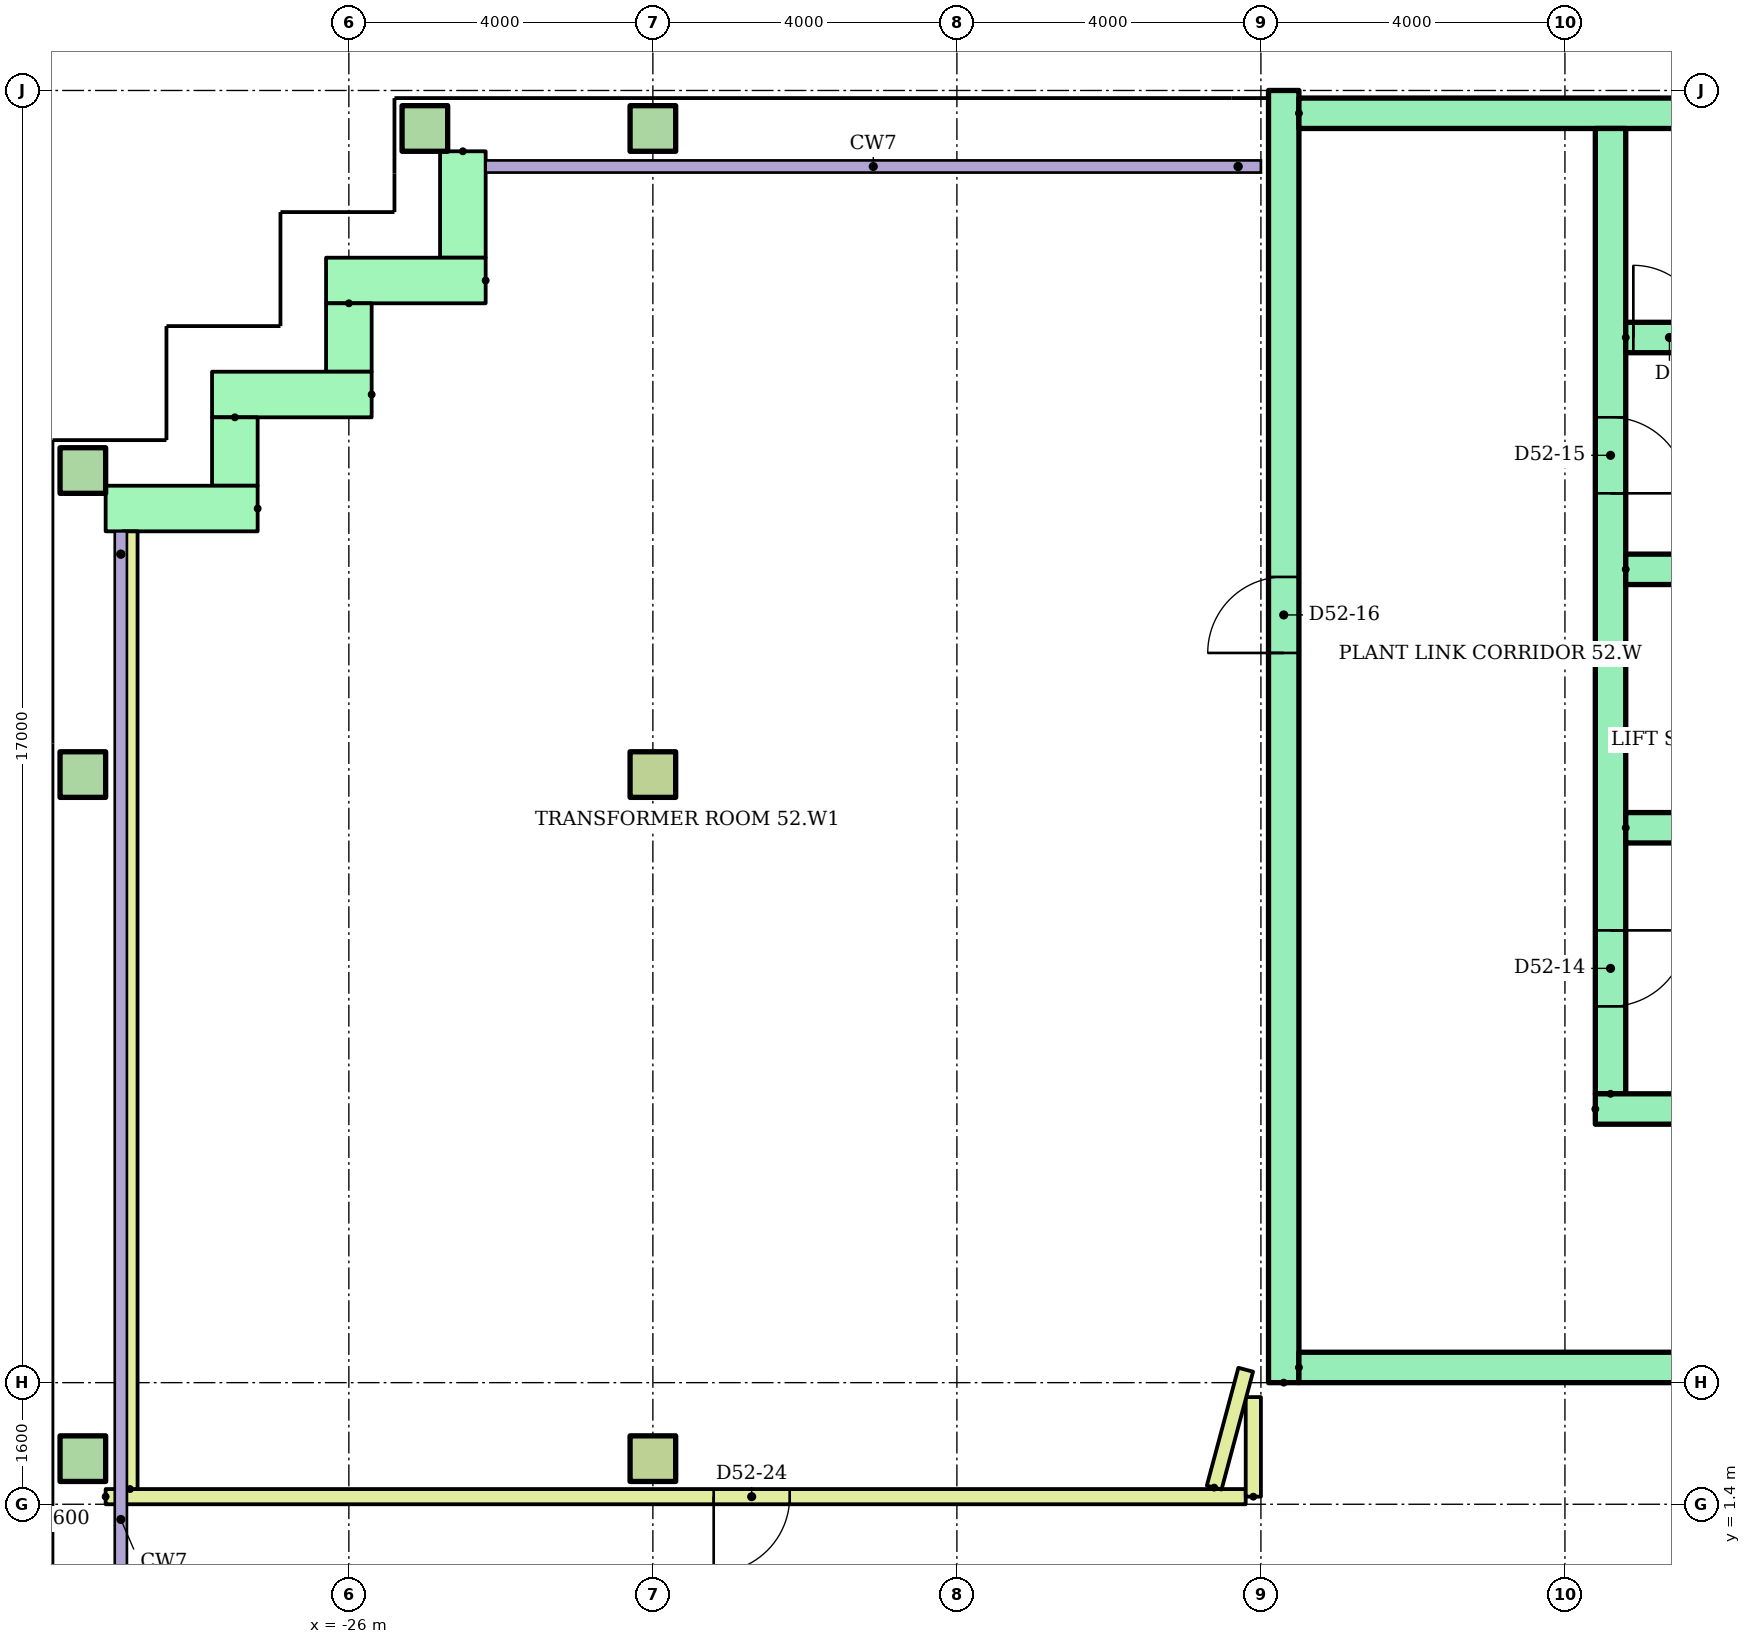
"""IFC4 building model, lengths in metres.
Left out: names, types, materials, properties, quantities, classifications, styles, units other than length and angle.
Written with IfcOpenShell. Run it as: python <this file> out.ifc"""

import sys

from ifc_helpers import new_model, si_unit, direction, frame, frame_2d, origin, origin_2d, place, context, subcontext, project, spatial, rectangle, hollow_rectangle, extrude, element, fill, save


model = new_model("IFC4")
c1 = context("Model", 3, precision=1e-05, world=origin(), true_north=direction((0.0, 1.0)))
c2 = subcontext(c1, "Body", "Model", "MODEL_VIEW")
j1 = project(units=[si_unit("LENGTHUNIT", "METRE"), si_unit("PLANEANGLEUNIT", "RADIAN")], contexts=[c1])
p1 = place(None, origin())
s1 = spatial("IfcSite", under=j1, at=p1, CompositionType="ELEMENT")
p2 = place(p1, origin())
s2 = spatial("IfcBuilding", under=s1, at=p2, CompositionType="ELEMENT")
p3 = place(p2, frame((0.0, 0.0, 203.7)))
s3 = spatial("IfcBuildingStorey", under=s2, at=p3, CompositionType="ELEMENT", Elevation=203.7)
p4 = place(p3, frame((-29.5, 2.0, 0.0)))
e1 = element("IfcColumn", 1, at=p4, inside=s3, PredefinedType="COLUMN", context=c2, shape_type="SweptSolid", body=[
    extrude(hollow_rectangle(XDim=0.6, YDim=0.6, WallThickness=0.03, at=origin_2d()), origin(), (0.0, 0.0, 1.0), 3.9),
])
p5 = place(p3, frame((-22.0, 2.0, 0.0)))
e2 = element("IfcColumn", 2, at=p5, inside=s3, PredefinedType="COLUMN", context=c2, shape_type="SweptSolid", body=[
    extrude(rectangle(XDim=0.6, YDim=0.6, at=origin_2d()), origin(), (0.0, 0.0, 1.0), 3.9),
])
p6 = place(p3, frame((-29.5, 11.0, 0.0)))
e3 = element("IfcColumn", 3, at=p6, inside=s3, PredefinedType="COLUMN", context=c2, shape_type="SweptSolid", body=[
    extrude(hollow_rectangle(XDim=0.6, YDim=0.6, WallThickness=0.03, at=origin_2d()), origin(), (0.0, 0.0, 1.0), 3.9),
])
p7 = place(p3, frame((-22.0, 11.0, 0.0)))
e4 = element("IfcColumn", 4, at=p7, inside=s3, PredefinedType="COLUMN", context=c2, shape_type="SweptSolid", body=[
    extrude(rectangle(XDim=0.6, YDim=0.6, at=origin_2d()), origin(), (0.0, 0.0, 1.0), 3.9),
])
for number, where in (
    (5, (-29.5, 15.0, 0.0)),
    (6, (-25.0, 19.5, 0.0)),
    (7, (-22.0, 19.5, 0.0)),
):
    element("IfcColumn", number, at=place(p3, frame(where)), inside=s3, PredefinedType="COLUMN", context=c2, shape_type="SweptSolid", body=[
        extrude(hollow_rectangle(XDim=0.6, YDim=0.6, WallThickness=0.03, at=origin_2d()), origin(), (0.0, 0.0, 1.0), 3.9),
    ])
p8 = place(p3, frame((-24.5, 19.2, 0.0), z_axis=(0.0, 0.0, 1.0), x_axis=(0.0, -1.0, 0.0)))
e8 = element("IfcWall", 8, at=p8, inside=s3, PredefinedType="STANDARD", context=c2, shape_type="SweptSolid", body=[
    extrude(rectangle(XDim=1.4, YDim=0.6, at=frame_2d((0.7, 0.0))), origin(), (0.0, 0.0, 1.0), 3.62),
])
p9 = place(p3, frame((-24.2, 17.5, 0.0), z_axis=(0.0, 0.0, 1.0), x_axis=(-1.0, 0.0, 0.0)))
e9 = element("IfcWall", 9, at=p9, inside=s3, PredefinedType="STANDARD", context=c2, shape_type="SweptSolid", body=[
    extrude(rectangle(XDim=2.1, YDim=0.6, at=frame_2d((1.05, 0.0))), origin(), (0.0, 0.0, 1.0), 3.62),
])
p10 = place(p3, frame((-26.0, 17.2, 0.0), z_axis=(0.0, 0.0, 1.0), x_axis=(0.0, -1.0, 0.0)))
e10 = element("IfcWall", 10, at=p10, inside=s3, PredefinedType="STANDARD", context=c2, shape_type="SweptSolid", body=[
    extrude(rectangle(XDim=0.9, YDim=0.6, at=frame_2d((0.45, 0.0))), origin(), (0.0, 0.0, 1.0), 3.62),
])
p11 = place(p3, frame((-25.7, 16.0, 0.0), z_axis=(0.0, 0.0, 1.0), x_axis=(-1.0, 0.0, 0.0)))
e11 = element("IfcWall", 11, at=p11, inside=s3, PredefinedType="STANDARD", context=c2, shape_type="SweptSolid", body=[
    extrude(rectangle(XDim=2.1, YDim=0.6, at=frame_2d((1.05, 0.0))), origin(), (0.0, 0.0, 1.0), 3.62),
])
p12 = place(p3, frame((-27.5, 15.7, 0.0), z_axis=(0.0, 0.0, 1.0), x_axis=(0.0, -1.0, 0.0)))
e12 = element("IfcWall", 12, at=p12, inside=s3, PredefinedType="STANDARD", context=c2, shape_type="SweptSolid", body=[
    extrude(rectangle(XDim=0.9, YDim=0.6, at=frame_2d((0.45, 0.0))), origin(), (0.0, 0.0, 1.0), 3.62),
])
p13 = place(p3, frame((-27.2, 14.5, 0.0), z_axis=(0.0, 0.0, 1.0), x_axis=(-1.0, 0.0, 0.0)))
e13 = element("IfcWall", 13, at=p13, inside=s3, PredefinedType="STANDARD", context=c2, shape_type="SweptSolid", body=[
    extrude(rectangle(XDim=2.0, YDim=0.6, at=frame_2d((1.0, 0.0))), origin(), (0.0, 0.0, 1.0), 3.62),
])
p14 = place(p3, frame((-13.7, 3.0, 0.0), z_axis=(0.0, 0.0, 1.0), x_axis=(0.0, 1.0, 0.0)))
e14 = element("IfcWall", 14, at=p14, inside=s3, PredefinedType="SHEAR", context=c2, shape_type="SweptSolid", body=[
    extrude(rectangle(XDim=17.0, YDim=0.4, at=frame_2d((8.5, 0.0))), origin(), (0.0, 0.0, 1.0), 3.62),
])
p15 = place(p14, frame((9.6, 0.0, 0.0)))
e15 = element("IfcOpeningElement", 15, at=p15, cuts=e14, PredefinedType="OPENING", context=c2, shape_type="SweptSolid", body=[
    extrude(rectangle(XDim=1.0, YDim=2.1, at=frame_2d((0.5, 1.05))), frame((0.0, 0.21, 0.0), z_axis=(0.0, -1.0, 0.0), x_axis=(1.0, 0.0, 0.0)), (0.0, 0.0, 1.0), 0.42),
])
p16 = place(p3, frame((-13.5, 19.7, 0.0)))
e16 = element("IfcWall", 16, at=p16, inside=s3, PredefinedType="SHEAR", context=c2, shape_type="SweptSolid", body=[
    extrude(rectangle(XDim=27.0, YDim=0.4, at=frame_2d((13.5, 0.0))), origin(), (0.0, 0.0, 1.0), 3.62),
])
p17 = place(p3, frame((-9.4, 6.8, 0.0), z_axis=(0.0, 0.0, 1.0), x_axis=(0.0, 1.0, 0.0)))
e17 = element("IfcWall", 17, at=p17, inside=s3, PredefinedType="SHEAR", context=c2, shape_type="SweptSolid", body=[
    extrude(rectangle(XDim=12.7, YDim=0.4, at=frame_2d((6.35, 0.0))), origin(), (0.0, 0.0, 1.0), 3.62),
])
p18 = place(p17, frame((1.15, 0.0, 0.0)))
e18 = element("IfcOpeningElement", 18, at=p18, cuts=e17, PredefinedType="OPENING", context=c2, shape_type="SweptSolid", body=[
    extrude(rectangle(XDim=1.0, YDim=2.1, at=frame_2d((0.5, 1.05))), frame((0.0, 0.21, 0.0), z_axis=(0.0, -1.0, 0.0), x_axis=(1.0, 0.0, 0.0)), (0.0, 0.0, 1.0), 0.42),
])
p19 = place(p17, frame((7.9, 0.0, 0.0)))
e19 = element("IfcOpeningElement", 19, at=p19, cuts=e17, PredefinedType="OPENING", context=c2, shape_type="SweptSolid", body=[
    extrude(rectangle(XDim=1.0, YDim=2.1, at=frame_2d((0.5, 1.05))), frame((0.0, 0.21, 0.0), z_axis=(0.0, -1.0, 0.0), x_axis=(1.0, 0.0, 0.0)), (0.0, 0.0, 1.0), 0.42),
])
p20 = place(p3, frame((-13.5, 3.2, 0.0)))
e20 = element("IfcWall", 20, at=p20, inside=s3, PredefinedType="SHEAR", context=c2, shape_type="SweptSolid", body=[
    extrude(rectangle(XDim=27.0, YDim=0.4, at=frame_2d((13.5, 0.0))), origin(), (0.0, 0.0, 1.0), 3.62),
])
p21 = place(p20, frame((22.083, 0.0, 0.0)))
e21 = element("IfcOpeningElement", 21, at=p21, cuts=e20, PredefinedType="OPENING", context=c2, shape_type="SweptSolid", body=[
    extrude(rectangle(XDim=1.1, YDim=2.1, at=frame_2d((0.55, 1.05))), frame((0.0, 0.21, 0.0), z_axis=(0.0, -1.0, 0.0), x_axis=(1.0, 0.0, 0.0)), (0.0, 0.0, 1.0), 0.42),
])
p22 = place(p20, frame((25.128, 0.0, 0.0)))
e22 = element("IfcOpeningElement", 22, at=p22, cuts=e20, PredefinedType="OPENING", context=c2, shape_type="SweptSolid", body=[
    extrude(rectangle(XDim=1.1, YDim=2.1, at=frame_2d((0.55, 1.05))), frame((0.0, 0.21, 0.0), z_axis=(0.0, -1.0, 0.0), x_axis=(1.0, 0.0, 0.0)), (0.0, 0.0, 1.0), 0.42),
])
p23 = place(p20, frame((12.6, 0.0, 0.0)))
e23 = element("IfcOpeningElement", 23, at=p23, cuts=e20, PredefinedType="OPENING", context=c2, shape_type="SweptSolid", body=[
    extrude(rectangle(XDim=1.8, YDim=2.1, at=frame_2d((0.9, 1.05))), frame((0.0, 0.21, 0.0), z_axis=(0.0, -1.0, 0.0), x_axis=(1.0, 0.0, 0.0)), (0.0, 0.0, 1.0), 0.42),
])
p24 = place(p3, frame((-9.6, 6.6, 0.0)))
e24 = element("IfcWall", 24, at=p24, inside=s3, PredefinedType="SHEAR", context=c2, shape_type="SweptSolid", body=[
    extrude(rectangle(XDim=8.078, YDim=0.4, at=frame_2d((4.039, 0.0))), origin(), (0.0, 0.0, 1.0), 3.62),
])
p25 = place(p24, frame((3.011, 0.0, 0.0)))
e25 = element("IfcOpeningElement", 25, at=p25, cuts=e24, PredefinedType="OPENING", context=c2, shape_type="SweptSolid", body=[
    extrude(rectangle(XDim=1.0, YDim=2.1, at=frame_2d((0.5, 1.05))), frame((0.0, 0.21, 0.0), z_axis=(0.0, -1.0, 0.0), x_axis=(1.0, 0.0, 0.0)), (0.0, 0.0, 1.0), 0.42),
])
p26 = place(p24, frame((6.056, 0.0, 0.0)))
e26 = element("IfcOpeningElement", 26, at=p26, cuts=e24, PredefinedType="OPENING", context=c2, shape_type="SweptSolid", body=[
    extrude(rectangle(XDim=1.0, YDim=2.1, at=frame_2d((0.5, 1.05))), frame((0.0, 0.21, 0.0), z_axis=(0.0, -1.0, 0.0), x_axis=(1.0, 0.0, 0.0)), (0.0, 0.0, 1.0), 0.42),
])
p27 = place(p3, frame((-9.2, 10.3, 0.0)))
e27 = element("IfcWall", 27, at=p27, inside=s3, PredefinedType="SHEAR", context=c2, shape_type="SweptSolid", body=[
    extrude(rectangle(XDim=8.0, YDim=0.4, at=frame_2d((4.0, 0.0))), origin(), (0.0, 0.0, 1.0), 3.62),
])
p28 = place(p27, frame((0.617, 0.0, 0.0)))
e28 = element("IfcOpeningElement", 28, at=p28, cuts=e27, PredefinedType="OPENING", context=c2, shape_type="SweptSolid", body=[
    extrude(rectangle(XDim=1.1, YDim=2.1, at=frame_2d((0.55, 1.05))), frame((0.0, 0.21, 0.0), z_axis=(0.0, -1.0, 0.0), x_axis=(1.0, 0.0, 0.0)), (0.0, 0.0, 1.0), 0.42),
])
p29 = place(p27, frame((3.4, 0.0, 0.0)))
e29 = element("IfcOpeningElement", 29, at=p29, cuts=e27, PredefinedType="OPENING", context=c2, shape_type="SweptSolid", body=[
    extrude(rectangle(XDim=1.0, YDim=2.1, at=frame_2d((0.5, 1.05))), frame((0.0, 0.21, 0.0), z_axis=(0.0, -1.0, 0.0), x_axis=(1.0, 0.0, 0.0)), (0.0, 0.0, 1.0), 0.42),
])
p30 = place(p27, frame((6.133, 0.0, 0.0)))
e30 = element("IfcOpeningElement", 30, at=p30, cuts=e27, PredefinedType="OPENING", context=c2, shape_type="SweptSolid", body=[
    extrude(rectangle(XDim=1.0, YDim=2.1, at=frame_2d((0.5, 1.05))), frame((0.0, 0.21, 0.0), z_axis=(0.0, -1.0, 0.0), x_axis=(1.0, 0.0, 0.0)), (0.0, 0.0, 1.0), 0.42),
])
p31 = place(p3, frame((-9.2, 13.7, 0.0)))
e31 = element("IfcWall", 31, at=p31, inside=s3, PredefinedType="SHEAR", context=c2, shape_type="SweptSolid", body=[
    extrude(rectangle(XDim=8.0, YDim=0.4, at=frame_2d((4.0, 0.0))), origin(), (0.0, 0.0, 1.0), 3.62),
])
p32 = place(p3, frame((-9.2, 16.75, 0.0)))
e32 = element("IfcWall", 32, at=p32, inside=s3, PredefinedType="SHEAR", context=c2, shape_type="SweptSolid", body=[
    extrude(rectangle(XDim=18.4, YDim=0.4, at=frame_2d((9.2, 0.0))), origin(), (0.0, 0.0, 1.0), 3.62),
])
p33 = place(p32, frame((0.1, 0.0, 0.0)))
e33 = element("IfcOpeningElement", 33, at=p33, cuts=e32, PredefinedType="OPENING", context=c2, shape_type="SweptSolid", body=[
    extrude(rectangle(XDim=0.95, YDim=2.1, at=frame_2d((0.475, 1.05))), frame((0.0, 0.21, 0.0), z_axis=(0.0, -1.0, 0.0), x_axis=(1.0, 0.0, 0.0)), (0.0, 0.0, 1.0), 0.42),
])
p34 = place(p32, frame((6.1, 0.0, 0.0)))
e34 = element("IfcOpeningElement", 34, at=p34, cuts=e32, PredefinedType="OPENING", context=c2, shape_type="SweptSolid", body=[
    extrude(rectangle(XDim=0.95, YDim=2.1, at=frame_2d((0.475, 1.05))), frame((0.0, 0.21, 0.0), z_axis=(0.0, -1.0, 0.0), x_axis=(1.0, 0.0, 0.0)), (0.0, 0.0, 1.0), 0.42),
])
p35 = place(p32, frame((12.1, 0.0, 0.0)))
e35 = element("IfcOpeningElement", 35, at=p35, cuts=e32, PredefinedType="OPENING", context=c2, shape_type="SweptSolid", body=[
    extrude(rectangle(XDim=0.95, YDim=2.1, at=frame_2d((0.475, 1.05))), frame((0.0, 0.21, 0.0), z_axis=(0.0, -1.0, 0.0), x_axis=(1.0, 0.0, 0.0)), (0.0, 0.0, 1.0), 0.42),
])
p36 = place(p3, frame((-29.2, 1.5, 0.0)))
e36 = element("IfcWall", 36, at=p36, inside=s3, PredefinedType="PARTITIONING", context=c2, shape_type="SweptSolid", body=[
    extrude(rectangle(XDim=15.0, YDim=0.2, at=frame_2d((7.5, 0.0))), origin(), (0.0, 0.0, 1.0), 3.62),
])
p37 = place(p36, frame((8.0, 0.0, 0.0)))
e37 = element("IfcOpeningElement", 37, at=p37, cuts=e36, PredefinedType="OPENING", context=c2, shape_type="SweptSolid", body=[
    extrude(rectangle(XDim=1.0, YDim=2.4, at=frame_2d((0.5, 1.2))), frame((0.0, 0.11, 0.0), z_axis=(0.0, -1.0, 0.0), x_axis=(1.0, 0.0, 0.0)), (0.0, 0.0, 1.0), 0.22),
])
p38 = place(p3, frame((-14.1, 1.5, 0.0), z_axis=(0.0, 0.0, 1.0), x_axis=(0.0, 1.0, 0.0)))
e38 = element("IfcWall", 38, at=p38, inside=s3, PredefinedType="PARTITIONING", context=c2, shape_type="SweptSolid", body=[
    extrude(rectangle(XDim=1.31, YDim=0.2, at=frame_2d((0.655, 0.0))), origin(), (0.0, 0.0, 1.0), 3.62),
])
p39 = place(p3, frame((-14.615, 1.619, 0.0), z_axis=(0.0, 0.0, 1.0), x_axis=(0.258429414785, 0.966030143201, 0.0)))
e39 = element("IfcWall", 39, at=p39, inside=s3, PredefinedType="PARTITIONING", context=c2, shape_type="SweptSolid", body=[
    extrude(rectangle(XDim=1.605, YDim=0.2, at=frame_2d((0.802, 0.0))), origin(), (0.0, 0.0, 1.0), 3.62),
])
p40 = place(p3, frame((-28.88, 1.6, 0.0), z_axis=(0.0, 0.0, 1.0), x_axis=(0.0, 1.0, 0.0)))
e40 = element("IfcWall", 40, at=p40, inside=s3, PredefinedType="PARTITIONING", context=c2, shape_type="SweptSolid", body=[
    extrude(rectangle(XDim=12.6, YDim=0.2, at=frame_2d((6.3, 0.0))), origin(), (0.0, 0.0, 1.0), 3.62),
])
p41 = place(p33, origin())
e41 = element("IfcDoor", 41, at=p41, inside=s3, OperationType="SINGLE_SWING_LEFT", PredefinedType="DOOR", context=c2, shape_type="SweptSolid", body=[
    extrude(rectangle(XDim=0.95, YDim=2.1, at=frame_2d((0.475, 1.05))), frame((0.0, 0.025, 0.0), z_axis=(0.0, -1.0, 0.0), x_axis=(1.0, 0.0, 0.0)), (0.0, 0.0, 1.0), 0.05),
])
fill(e33, e41)
p42 = place(p18, frame((1.0, 0.0, 0.0), z_axis=(0.0, 0.0, 1.0), x_axis=(-1.0, 0.0, 0.0)))
e42 = element("IfcDoor", 42, at=p42, inside=s3, OperationType="SINGLE_SWING_RIGHT", PredefinedType="DOOR", context=c2, shape_type="SweptSolid", body=[
    extrude(rectangle(XDim=1.0, YDim=2.1, at=frame_2d((0.5, 1.05))), frame((0.0, 0.025, 0.0), z_axis=(0.0, -1.0, 0.0), x_axis=(1.0, 0.0, 0.0)), (0.0, 0.0, 1.0), 0.05),
])
fill(e18, e42)
p43 = place(p19, frame((1.0, 0.0, 0.0), z_axis=(0.0, 0.0, 1.0), x_axis=(-1.0, 0.0, 0.0)))
e43 = element("IfcDoor", 43, at=p43, inside=s3, OperationType="SINGLE_SWING_LEFT", PredefinedType="DOOR", context=c2, shape_type="SweptSolid", body=[
    extrude(rectangle(XDim=1.0, YDim=2.1, at=frame_2d((0.5, 1.05))), frame((0.0, 0.025, 0.0), z_axis=(0.0, -1.0, 0.0), x_axis=(1.0, 0.0, 0.0)), (0.0, 0.0, 1.0), 0.05),
])
fill(e19, e43)
p44 = place(p15, origin())
e44 = element("IfcDoor", 44, at=p44, inside=s3, OperationType="SINGLE_SWING_LEFT", PredefinedType="DOOR", context=c2, shape_type="SweptSolid", body=[
    extrude(rectangle(XDim=1.0, YDim=2.1, at=frame_2d((0.5, 1.05))), frame((0.0, 0.025, 0.0), z_axis=(0.0, -1.0, 0.0), x_axis=(1.0, 0.0, 0.0)), (0.0, 0.0, 1.0), 0.05),
])
fill(e15, e44)
p45 = place(p37, frame((1.0, 0.0, 0.0), z_axis=(0.0, 0.0, 1.0), x_axis=(-1.0, 0.0, 0.0)))
e45 = element("IfcDoor", 45, at=p45, inside=s3, OperationType="SINGLE_SWING_LEFT", PredefinedType="DOOR", context=c2, shape_type="SweptSolid", body=[
    extrude(rectangle(XDim=1.0, YDim=2.4, at=frame_2d((0.5, 1.2))), frame((0.0, 0.025, 0.0), z_axis=(0.0, -1.0, 0.0), x_axis=(1.0, 0.0, 0.0)), (0.0, 0.0, 1.0), 0.05),
])
fill(e37, e45)
save(model, sys.argv[1])
